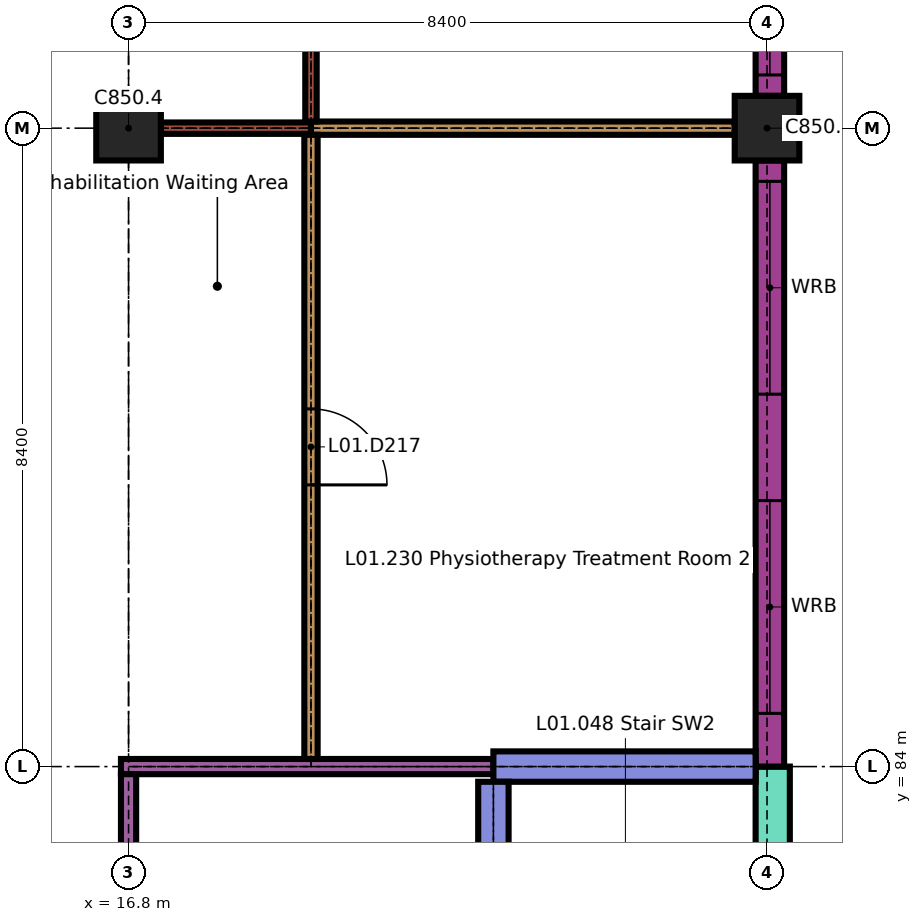
"""IFC4 building model, lengths in metres.
Left out: names, types, materials, properties, quantities, classifications, styles, units other than length and angle.
Written with IfcOpenShell. Run it as: python <this file> out.ifc"""

import sys

from ifc_helpers import new_model, si_unit, direction, frame, frame_2d, origin, origin_2d, place, context, subcontext, project, spatial, rectangle, extrude, element, fill, save


model = new_model("IFC4")
c1 = context("Model", 3, precision=1e-05, world=origin(), true_north=direction((0.0, 1.0)))
c2 = subcontext(c1, "Body", "Model", "MODEL_VIEW")
j1 = project(units=[si_unit("LENGTHUNIT", "METRE"), si_unit("PLANEANGLEUNIT", "RADIAN")], contexts=[c1])
p1 = place(None, origin())
s1 = spatial("IfcSite", under=j1, at=p1, CompositionType="ELEMENT")
p2 = place(p1, origin())
s2 = spatial("IfcBuilding", under=s1, at=p2, CompositionType="ELEMENT")
p3 = place(p2, frame((0.0, 0.0, 4.5)))
s3 = spatial("IfcBuildingStorey", under=s2, at=p3, CompositionType="ELEMENT", Elevation=4.5)
for number, where, z_axis, x_axis in (
    (1, (16.8, 92.4, 0.0), (0.0, 0.0, 1.0), (1.0, 0.0, 0.0)),
    (2, (25.2, 92.4, 0.0), (0.0, 0.0, 1.0), (1.0, 0.0, 0.0)),
):
    element("IfcColumn", number, at=place(p3, frame(where, z_axis=z_axis, x_axis=x_axis)), inside=s3, PredefinedType="COLUMN", context=c2, shape_type="SweptSolid", body=[
        extrude(rectangle(XDim=0.85, YDim=0.85, at=origin_2d()), origin(), (0.0, 0.0, 1.0), 3.45),
    ])
p4 = place(p3, frame((25.275, 80.15, 0.0), z_axis=(0.0, 0.0, 1.0), x_axis=(0.0, 1.0, 0.0)))
e3 = element("IfcWall", 3, at=p4, inside=s3, PredefinedType="SOLIDWALL", context=c2, shape_type="SweptSolid", body=[
    extrude(rectangle(XDim=3.85, YDim=0.45, at=frame_2d((1.925, 0.0))), origin(), (0.0, 0.0, 1.0), 3.45),
])
p5 = place(p3, frame((25.238, 84.0, 0.0), z_axis=(0.0, 0.0, 1.0), x_axis=(0.0, 1.0, 0.0)))
e4 = element("IfcWall", 4, at=p5, inside=s3, PredefinedType="SOLIDWALL", context=c2, shape_type="SweptSolid", body=[
    extrude(rectangle(XDim=7.975, YDim=0.375, at=frame_2d((3.988, 0.0))), origin(), (0.0, 0.0, 1.0), 3.15),
])
p6 = place(p5, frame((0.7, 0.0, 1.0)))
e5 = element("IfcOpeningElement", 5, at=p6, cuts=e4, PredefinedType="OPENING", context=c2, shape_type="SweptSolid", body=[
    extrude(rectangle(XDim=2.8, YDim=1.2, at=frame_2d((1.4, 0.6))), frame((0.0, 0.198, 0.0), z_axis=(0.0, -1.0, 0.0), x_axis=(1.0, 0.0, 0.0)), (0.0, 0.0, 1.0), 0.395),
])
p7 = place(p5, frame((4.9, 0.0, 1.0)))
e6 = element("IfcOpeningElement", 6, at=p7, cuts=e4, PredefinedType="OPENING", context=c2, shape_type="SweptSolid", body=[
    extrude(rectangle(XDim=2.8, YDim=1.2, at=frame_2d((1.4, 0.6))), frame((0.0, 0.198, 0.0), z_axis=(0.0, -1.0, 0.0), x_axis=(1.0, 0.0, 0.0)), (0.0, 0.0, 1.0), 0.395),
])
p8 = place(p3, frame((25.238, 92.825, 0.0), z_axis=(0.0, 0.0, 1.0), x_axis=(0.0, 1.0, 0.0)))
e7 = element("IfcWall", 7, at=p8, inside=s3, PredefinedType="SOLIDWALL", context=c2, shape_type="SweptSolid", body=[
    extrude(rectangle(XDim=7.55, YDim=0.375, at=frame_2d((3.775, 0.0))), origin(), (0.0, 0.0, 1.0), 3.15),
])
p9 = place(p8, frame((0.275, 0.0, 1.0)))
e8 = element("IfcOpeningElement", 8, at=p9, cuts=e7, PredefinedType="OPENING", context=c2, shape_type="SweptSolid", body=[
    extrude(rectangle(XDim=2.8, YDim=1.2, at=frame_2d((1.4, 0.6))), frame((0.0, 0.198, 0.0), z_axis=(0.0, -1.0, 0.0), x_axis=(1.0, 0.0, 0.0)), (0.0, 0.0, 1.0), 0.395),
])
p10 = place(p8, frame((4.475, 0.0, 1.0)))
e9 = element("IfcOpeningElement", 9, at=p10, cuts=e7, PredefinedType="OPENING", context=c2, shape_type="SweptSolid", body=[
    extrude(rectangle(XDim=2.8, YDim=1.2, at=frame_2d((1.4, 0.6))), frame((0.0, 0.198, 0.0), z_axis=(0.0, -1.0, 0.0), x_axis=(1.0, 0.0, 0.0)), (0.0, 0.0, 1.0), 0.395),
])
p11 = place(p3, frame((16.7, 84.0, 0.0), z_axis=(0.0, 0.0, 1.0), x_axis=(1.0, 0.0, 0.0)))
e10 = element("IfcWall", 10, at=p11, inside=s3, PredefinedType="PARTITIONING", context=c2, shape_type="SweptSolid", body=[
    extrude(rectangle(XDim=4.9, YDim=0.2, at=frame_2d((2.45, 0.0))), origin(), (0.0, 0.0, 1.0), 3.45),
])
p12 = place(p3, frame((21.6, 84.0, 0.0), z_axis=(0.0, 0.0, 1.0), x_axis=(1.0, 0.0, 0.0)))
e11 = element("IfcWall", 11, at=p12, inside=s3, PredefinedType="SHEAR", context=c2, shape_type="SweptSolid", body=[
    extrude(rectangle(XDim=3.45, YDim=0.4, at=frame_2d((1.725, 0.0))), origin(), (0.0, 0.0, 1.0), 3.45),
])
p13 = place(p3, frame((17.225, 92.4, 0.0), z_axis=(0.0, 0.0, 1.0), x_axis=(1.0, 0.0, 0.0)))
e12 = element("IfcWall", 12, at=p13, inside=s3, PredefinedType="PARTITIONING", context=c2, shape_type="SweptSolid", body=[
    extrude(rectangle(XDim=1.975, YDim=0.15, at=frame_2d((0.987, 0.0))), origin(), (0.0, 0.0, 1.0), 3.45),
])
p14 = place(p3, frame((19.2, 92.4, 0.0), z_axis=(0.0, 0.0, 1.0), x_axis=(1.0, 0.0, 0.0)))
e13 = element("IfcWall", 13, at=p14, inside=s3, PredefinedType="PARTITIONING", context=c2, shape_type="SweptSolid", body=[
    extrude(rectangle(XDim=5.575, YDim=0.175, at=frame_2d((2.788, 0.0))), origin(), (0.0, 0.0, 1.0), 3.45),
])
p15 = place(p3, frame((16.8, 75.7, 0.0), z_axis=(0.0, 0.0, 1.0), x_axis=(0.0, 1.0, 0.0)))
e14 = element("IfcWall", 14, at=p15, inside=s3, PredefinedType="PARTITIONING", context=c2, shape_type="SweptSolid", body=[
    extrude(rectangle(XDim=8.2, YDim=0.2, at=frame_2d((4.1, 0.0))), origin(), (0.0, 0.0, 1.0), 3.45),
])
p16 = place(p15, frame((3.4, 0.0, 0.0)))
e15 = element("IfcOpeningElement", 15, at=p16, cuts=e14, PredefinedType="OPENING", context=c2, shape_type="SweptSolid", body=[
    extrude(rectangle(XDim=1.4, YDim=2.1, at=frame_2d((0.7, 1.05))), frame((0.0, 0.11, 0.0), z_axis=(0.0, -1.0, 0.0), x_axis=(1.0, 0.0, 0.0)), (0.0, 0.0, 1.0), 0.22),
])
p17 = place(p3, frame((19.2, 84.1, 0.0), z_axis=(0.0, 0.0, 1.0), x_axis=(0.0, 1.0, 0.0)))
e16 = element("IfcWall", 16, at=p17, inside=s3, PredefinedType="PARTITIONING", context=c2, shape_type="SweptSolid", body=[
    extrude(rectangle(XDim=8.212, YDim=0.175, at=frame_2d((4.106, 0.0))), origin(), (0.0, 0.0, 1.0), 3.45),
])
p18 = place(p17, frame((3.606, 0.0, 0.0)))
e17 = element("IfcOpeningElement", 17, at=p18, cuts=e16, PredefinedType="OPENING", context=c2, shape_type="SweptSolid", body=[
    extrude(rectangle(XDim=1.0, YDim=2.1, at=frame_2d((0.5, 1.05))), frame((0.0, 0.097, 0.0), z_axis=(0.0, -1.0, 0.0), x_axis=(1.0, 0.0, 0.0)), (0.0, 0.0, 1.0), 0.195),
])
p19 = place(p3, frame((19.2, 92.488, 0.0), z_axis=(0.0, 0.0, 1.0), x_axis=(0.0, 1.0, 0.0)))
e18 = element("IfcWall", 18, at=p19, inside=s3, PredefinedType="PARTITIONING", context=c2, shape_type="SweptSolid", body=[
    extrude(rectangle(XDim=16.613, YDim=0.15, at=frame_2d((8.306, 0.0))), origin(), (0.0, 0.0, 1.0), 3.45),
])
p20 = place(p19, frame((3.656, 0.0, 0.0)))
e19 = element("IfcOpeningElement", 19, at=p20, cuts=e18, PredefinedType="OPENING", context=c2, shape_type="SweptSolid", body=[
    extrude(rectangle(XDim=1.0, YDim=2.1, at=frame_2d((0.5, 1.05))), frame((0.0, 0.085, 0.0), z_axis=(0.0, -1.0, 0.0), x_axis=(1.0, 0.0, 0.0)), (0.0, 0.0, 1.0), 0.17),
])
p21 = place(p19, frame((9.913, 0.0, 0.0)))
e20 = element("IfcOpeningElement", 20, at=p21, cuts=e18, PredefinedType="OPENING", context=c2, shape_type="SweptSolid", body=[
    extrude(rectangle(XDim=1.0, YDim=2.1, at=frame_2d((0.5, 1.05))), frame((0.0, 0.085, 0.0), z_axis=(0.0, -1.0, 0.0), x_axis=(1.0, 0.0, 0.0)), (0.0, 0.0, 1.0), 0.17),
])
p22 = place(p19, frame((14.062, 0.0, 0.0)))
e21 = element("IfcOpeningElement", 21, at=p22, cuts=e18, PredefinedType="OPENING", context=c2, shape_type="SweptSolid", body=[
    extrude(rectangle(XDim=1.0, YDim=2.1, at=frame_2d((0.5, 1.05))), frame((0.0, 0.085, 0.0), z_axis=(0.0, -1.0, 0.0), x_axis=(1.0, 0.0, 0.0)), (0.0, 0.0, 1.0), 0.17),
])
p23 = place(p3, frame((21.6, 75.8, 0.0), z_axis=(0.0, 0.0, 1.0), x_axis=(0.0, 1.0, 0.0)))
e22 = element("IfcWall", 22, at=p23, inside=s3, PredefinedType="SHEAR", context=c2, shape_type="SweptSolid", body=[
    extrude(rectangle(XDim=8.0, YDim=0.4, at=frame_2d((4.0, 0.0))), origin(), (0.0, 0.0, 1.0), 3.45),
])
p24 = place(p23, frame((0.4, 0.0, 0.0)))
e23 = element("IfcOpeningElement", 23, at=p24, cuts=e22, PredefinedType="OPENING", context=c2, shape_type="SweptSolid", body=[
    extrude(rectangle(XDim=1.2, YDim=2.1, at=frame_2d((0.6, 1.05))), frame((0.0, 0.21, 0.0), z_axis=(0.0, -1.0, 0.0), x_axis=(1.0, 0.0, 0.0)), (0.0, 0.0, 1.0), 0.42),
])
p25 = place(p6, origin())
e24 = element("IfcWindow", 24, at=p25, inside=s3, PartitioningType="DOUBLE_PANEL_VERTICAL", PredefinedType="WINDOW", context=c2, shape_type="SweptSolid", body=[
    extrude(rectangle(XDim=2.8, YDim=1.2, at=frame_2d((1.4, 0.6))), frame((0.0, 0.03, 0.0), z_axis=(0.0, -1.0, 0.0), x_axis=(1.0, 0.0, 0.0)), (0.0, 0.0, 1.0), 0.06),
])
fill(e5, e24)
p26 = place(p7, origin())
e25 = element("IfcWindow", 25, at=p26, inside=s3, PartitioningType="DOUBLE_PANEL_VERTICAL", PredefinedType="WINDOW", context=c2, shape_type="SweptSolid", body=[
    extrude(rectangle(XDim=2.8, YDim=1.2, at=frame_2d((1.4, 0.6))), frame((0.0, 0.03, 0.0), z_axis=(0.0, -1.0, 0.0), x_axis=(1.0, 0.0, 0.0)), (0.0, 0.0, 1.0), 0.06),
])
fill(e6, e25)
p27 = place(p9, origin())
e26 = element("IfcWindow", 26, at=p27, inside=s3, PartitioningType="DOUBLE_PANEL_VERTICAL", PredefinedType="WINDOW", context=c2, shape_type="SweptSolid", body=[
    extrude(rectangle(XDim=2.8, YDim=1.2, at=frame_2d((1.4, 0.6))), frame((0.0, 0.03, 0.0), z_axis=(0.0, -1.0, 0.0), x_axis=(1.0, 0.0, 0.0)), (0.0, 0.0, 1.0), 0.06),
])
fill(e8, e26)
p28 = place(p18, origin())
e27 = element("IfcDoor", 27, at=p28, inside=s3, OperationType="SINGLE_SWING_LEFT", PredefinedType="DOOR", context=c2, shape_type="SweptSolid", body=[
    extrude(rectangle(XDim=1.0, YDim=2.1, at=frame_2d((0.5, 1.05))), frame((0.0, 0.035, 0.0), z_axis=(0.0, -1.0, 0.0), x_axis=(1.0, 0.0, 0.0)), (0.0, 0.0, 1.0), 0.07),
])
fill(e17, e27)
save(model, sys.argv[1])
